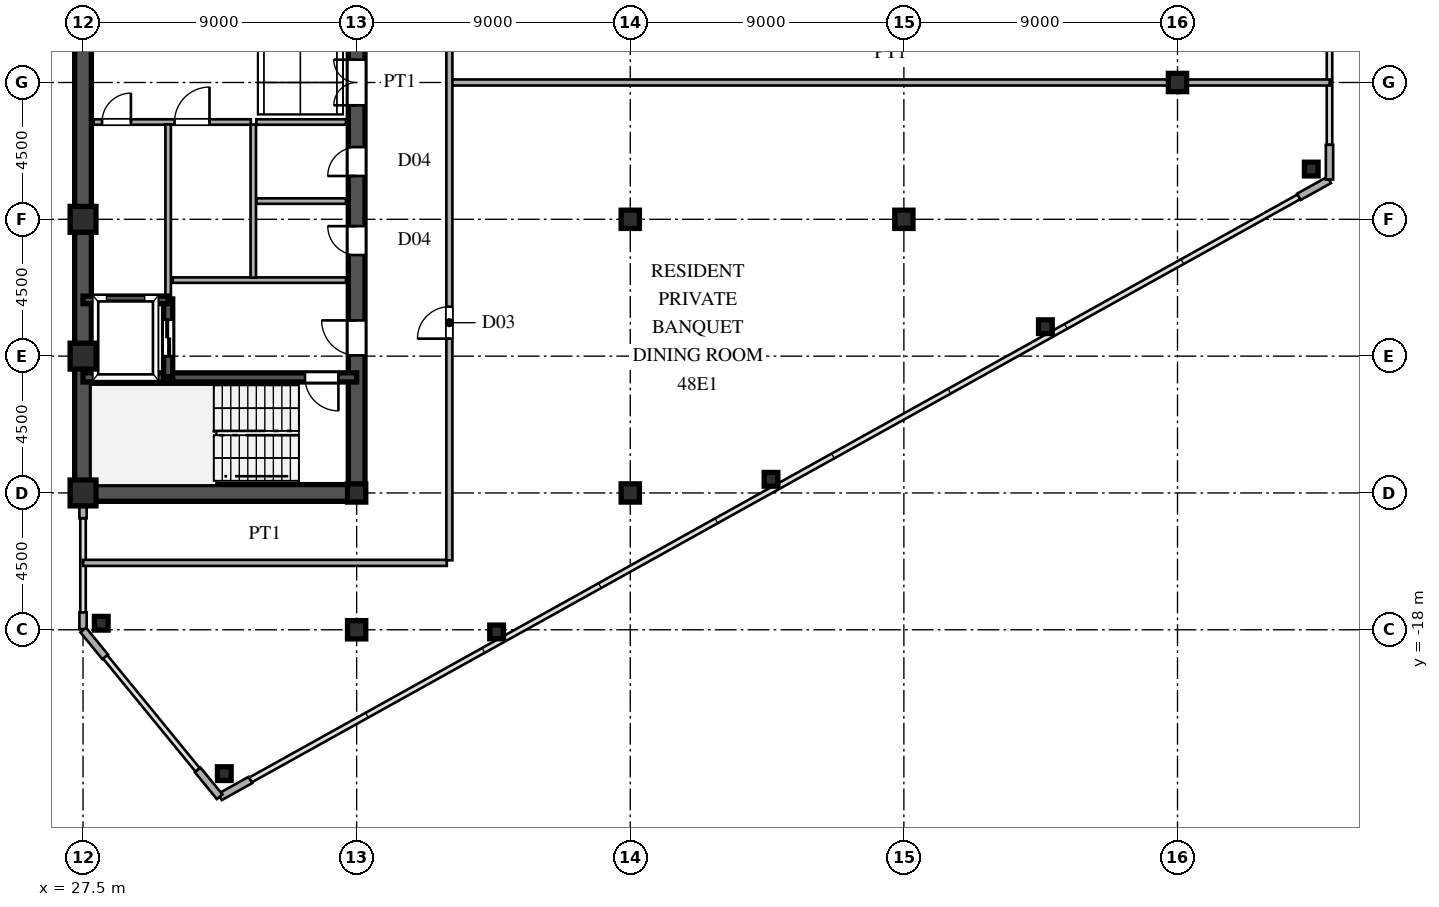
"""IFC4 building model, lengths in metres.
Left out: names, types, materials, properties, quantities, classifications, styles, units other than length and angle.
Written with IfcOpenShell. Run it as: python <this file> out.ifc"""

import sys

from ifc_helpers import new_model, si_unit, direction, frame, frame_2d, origin, origin_2d, place, context, subcontext, project, spatial, rectangle, hollow_rectangle, i_section, extrude, source, transform, mapped, element, fill, save


model = new_model("IFC4")
c1 = context("Model", 3, precision=1e-05, world=origin(), true_north=direction((0.0, 1.0)))
c2 = subcontext(c1, "Body", "Model", "MODEL_VIEW")
j1 = project(units=[si_unit("LENGTHUNIT", "METRE"), si_unit("PLANEANGLEUNIT", "RADIAN")], contexts=[c1])
p1 = place(None, origin())
s1 = spatial("IfcSite", under=j1, at=p1, CompositionType="ELEMENT")
p2 = place(p1, origin())
s2 = spatial("IfcBuilding", under=s1, at=p2, CompositionType="ELEMENT")
p3 = place(p2, frame((0.0, 0.0, 181.5)))
s3 = spatial("IfcBuildingStorey", under=s2, at=p3, CompositionType="ELEMENT", Elevation=181.5)
m1 = source(origin(), c2, "Body", "SweptSolid", [
    extrude(hollow_rectangle(XDim=0.85, YDim=0.85, WallThickness=0.036, at=origin_2d()), origin(), (0.0, 0.0, 1.0), 3.6),
])
for number, where, z_axis, x_axis in (
    (1, (27.5, -13.5, 0.0), (0.0, 0.0, 1.0), (1.0, 0.0, 0.0)),
    (2, (27.5, -9.0, 0.0), (0.0, 0.0, 1.0), (1.0, 0.0, 0.0)),
    (3, (27.5, -4.5, 0.0), (0.0, 0.0, 1.0), (1.0, 0.0, 0.0)),
):
    element("IfcColumn", number, at=place(p3, frame(where, z_axis=z_axis, x_axis=x_axis)), inside=s3, PredefinedType="COLUMN", context=c2, shape_type="MappedRepresentation", body=[
        mapped(m1, transform((0.0, 0.0, 0.0), scale=1.0)),
    ])
m2 = source(origin(), c2, "Body", "SweptSolid", [
    extrude(i_section(OverallWidth=0.6, OverallDepth=0.6, WebThickness=0.025, FlangeThickness=0.04, at=origin_2d()), origin(), (0.0, 0.0, 1.0), 3.6),
])
for number, where, z_axis, x_axis in (
    (4, (36.5, -18.0, 0.0), (0.0, 0.0, 1.0), (1.0, 0.0, 0.0)),
    (5, (36.5, -13.5, 0.0), (0.0, 0.0, 1.0), (1.0, 0.0, 0.0)),
    (6, (45.5, -13.5, 0.0), (0.0, 0.0, 1.0), (1.0, 0.0, 0.0)),
    (7, (45.5, -4.5, 0.0), (0.0, 0.0, 1.0), (1.0, 0.0, 0.0)),
    (8, (54.5, -4.5, 0.0), (0.0, 0.0, 1.0), (1.0, 0.0, 0.0)),
    (9, (63.5, 0.0, 0.0), (0.0, 0.0, 1.0), (1.0, 0.0, 0.0)),
):
    element("IfcColumn", number, at=place(p3, frame(where, z_axis=z_axis, x_axis=x_axis)), inside=s3, PredefinedType="COLUMN", context=c2, shape_type="MappedRepresentation", body=[
        mapped(m2, transform((0.0, 0.0, 0.0), scale=1.0)),
    ])
m3 = source(origin(), c2, "Body", "SweptSolid", [
    extrude(hollow_rectangle(XDim=0.45, YDim=0.45, WallThickness=0.018, at=origin_2d()), origin(), (0.0, 0.0, 1.0), 3.6),
])
for number, where, z_axis, x_axis in (
    (10, (32.147, -22.732, 0.0), (0.0, 0.0, 1.0), (1.0, 0.0, 0.0)),
    (11, (67.9, -2.847, 0.0), (0.0, 0.0, 1.0), (1.0, 0.0, 0.0)),
    (12, (28.1, -17.786, 0.0), (0.0, 0.0, 1.0), (1.0, 0.0, 0.0)),
    (13, (41.104, -18.071, 0.0), (0.0, 0.0, 1.0), (1.0, 0.0, 0.0)),
    (14, (50.129, -13.051, 0.0), (0.0, 0.0, 1.0), (1.0, 0.0, 0.0)),
    (15, (59.155, -8.031, 0.0), (0.0, 0.0, 1.0), (1.0, 0.0, 0.0)),
):
    element("IfcColumn", number, at=place(p3, frame(where, z_axis=z_axis, x_axis=x_axis)), inside=s3, PredefinedType="COLUMN", context=c2, shape_type="MappedRepresentation", body=[
        mapped(m3, transform((0.0, 0.0, 0.0), scale=1.0)),
    ])
for number, where, z_axis, x_axis in (
    (16, (32.009, -23.495, 0.0), (0.0, 0.0, 1.0), (0.874, 0.486, 0.0)),
    (17, (67.495, -3.759, 0.0), (0.0, 0.0, 1.0), (0.874, 0.486, 0.0)),
    (18, (68.5, -3.19, 0.0), (0.0, 0.0, 1.0), (0.0, 1.0, 0.0)),
):
    element("IfcWall", number, at=place(p3, frame(where, z_axis=z_axis, x_axis=x_axis)), inside=s3, PredefinedType="SOLIDWALL", context=c2, shape_type="SweptSolid", body=[
        extrude(rectangle(XDim=1.14, YDim=0.24, at=frame_2d((0.57, 0.0))), origin(), (0.0, 0.0, 1.0), 3.38),
    ])
p4 = place(p3, frame((27.5, -17.98, 0.0), z_axis=(0.0, 0.0, 1.0), x_axis=(0.0, 1.0, 0.0)))
e19 = element("IfcWall", 19, at=p4, inside=s3, PredefinedType="SOLIDWALL", context=c2, shape_type="SweptSolid", body=[
    extrude(rectangle(XDim=0.55, YDim=0.24, at=frame_2d((0.275, 0.0))), origin(), (0.0, 0.0, 1.0), 3.38),
])
p5 = place(p3, frame((27.5, -14.33, 0.0), z_axis=(0.0, 0.0, 1.0), x_axis=(0.0, 1.0, 0.0)))
e20 = element("IfcWall", 20, at=p5, inside=s3, PredefinedType="SOLIDWALL", context=c2, shape_type="SweptSolid", body=[
    extrude(rectangle(XDim=0.55, YDim=0.24, at=frame_2d((0.275, 0.0))), origin(), (0.0, 0.0, 1.0), 2.88),
])
for number, where, z_axis, x_axis in (
    (21, (27.506, -18.008, 0.0), (0.0, 0.0, 1.0), (0.633, -0.774, 0.0)),
    (22, (31.272, -22.61, 0.0), (0.0, 0.0, 1.0), (0.633, -0.774, 0.0)),
):
    element("IfcWall", number, at=place(p3, frame(where, z_axis=z_axis, x_axis=x_axis)), inside=s3, PredefinedType="SOLIDWALL", context=c2, shape_type="SweptSolid", body=[
        extrude(rectangle(XDim=1.14, YDim=0.24, at=frame_2d((0.57, 0.0))), origin(), (0.0, 0.0, 1.0), 3.38),
    ])
p6 = place(p3, frame((27.5, -13.5, 0.0), z_axis=(0.0, 0.0, 1.0), x_axis=(0.0, 1.0, 0.0)))
e23 = element("IfcWall", 23, at=p6, inside=s3, PredefinedType="SHEAR", context=c2, shape_type="SweptSolid", body=[
    extrude(rectangle(XDim=12.2, YDim=0.55, at=frame_2d((6.1, 0.0))), origin(), (0.0, 0.0, 1.0), 3.38),
])
p7 = place(p3, frame((27.5, -1.3, 0.0), z_axis=(0.0, 0.0, 1.0), x_axis=(0.0, 1.0, 0.0)))
e24 = element("IfcWall", 24, at=p7, inside=s3, PredefinedType="SHEAR", context=c2, shape_type="SweptSolid", body=[
    extrude(rectangle(XDim=2.6, YDim=0.55, at=frame_2d((1.3, 0.0))), origin(), (0.0, 0.0, 1.0), 3.38),
])
p8 = place(p3, frame((27.5, -13.5, 0.0), z_axis=(0.0, 0.0, 1.0), x_axis=(1.0, 0.0, 0.0)))
e25 = element("IfcWall", 25, at=p8, inside=s3, PredefinedType="SHEAR", context=c2, shape_type="SweptSolid", body=[
    extrude(rectangle(XDim=9.0, YDim=0.55, at=frame_2d((4.5, 0.0))), origin(), (0.0, 0.0, 1.0), 3.38),
])
p9 = place(p3, frame((36.5, -13.65, 0.0), z_axis=(0.0, 0.0, 1.0), x_axis=(0.0, 1.0, 0.0)))
e26 = element("IfcWall", 26, at=p9, inside=s3, PredefinedType="SHEAR", context=c2, shape_type="SweptSolid", body=[
    extrude(rectangle(XDim=7.15, YDim=0.55, at=frame_2d((3.575, 0.0))), origin(), (0.0, 0.0, 1.0), 3.38),
])
p10 = place(p9, frame((4.675, 0.0, 0.0)))
e27 = element("IfcOpeningElement", 27, at=p10, cuts=e26, PredefinedType="OPENING", context=c2, shape_type="SweptSolid", body=[
    extrude(rectangle(XDim=1.15, YDim=2.2, at=frame_2d((0.575, 1.1))), frame((0.0, 0.285, 0.0), z_axis=(0.0, -1.0, 0.0), x_axis=(1.0, 0.0, 0.0)), (0.0, 0.0, 1.0), 0.57),
])
p11 = place(p3, frame((36.5, -1.3, 0.0), z_axis=(0.0, 0.0, 1.0), x_axis=(0.0, 1.0, 0.0)))
e28 = element("IfcWall", 28, at=p11, inside=s3, PredefinedType="SHEAR", context=c2, shape_type="SweptSolid", body=[
    extrude(rectangle(XDim=2.6, YDim=0.55, at=frame_2d((1.3, 0.0))), origin(), (0.0, 0.0, 1.0), 3.38),
])
p12 = place(p11, frame((0.55, 0.0, 0.0)))
e29 = element("IfcOpeningElement", 29, at=p12, cuts=e28, PredefinedType="OPENING", context=c2, shape_type="SweptSolid", body=[
    extrude(rectangle(XDim=1.5, YDim=2.3, at=frame_2d((0.75, 1.15))), frame((0.0, 0.285, 0.0), z_axis=(0.0, -1.0, 0.0), x_axis=(1.0, 0.0, 0.0)), (0.0, 0.0, 1.0), 0.57),
])
p13 = place(p3, frame((36.5, -6.5, 0.0), z_axis=(0.0, 0.0, 1.0), x_axis=(0.0, 1.0, 0.0)))
e30 = element("IfcWall", 30, at=p13, inside=s3, PredefinedType="SHEAR", context=c2, shape_type="SweptSolid", body=[
    extrude(rectangle(XDim=2.6, YDim=0.55, at=frame_2d((1.3, 0.0))), origin(), (0.0, 0.0, 1.0), 3.38),
])
p14 = place(p13, frame((0.825, 0.0, 0.0)))
e31 = element("IfcOpeningElement", 31, at=p14, cuts=e30, PredefinedType="OPENING", context=c2, shape_type="SweptSolid", body=[
    extrude(rectangle(XDim=0.95, YDim=2.15, at=frame_2d((0.475, 1.075))), frame((0.0, 0.285, 0.0), z_axis=(0.0, -1.0, 0.0), x_axis=(1.0, 0.0, 0.0)), (0.0, 0.0, 1.0), 0.57),
])
p15 = place(p3, frame((36.5, -3.9, 0.0), z_axis=(0.0, 0.0, 1.0), x_axis=(0.0, 1.0, 0.0)))
e32 = element("IfcWall", 32, at=p15, inside=s3, PredefinedType="SHEAR", context=c2, shape_type="SweptSolid", body=[
    extrude(rectangle(XDim=2.6, YDim=0.55, at=frame_2d((1.3, 0.0))), origin(), (0.0, 0.0, 1.0), 3.38),
])
p16 = place(p15, frame((0.825, 0.0, 0.0)))
e33 = element("IfcOpeningElement", 33, at=p16, cuts=e32, PredefinedType="OPENING", context=c2, shape_type="SweptSolid", body=[
    extrude(rectangle(XDim=0.95, YDim=2.15, at=frame_2d((0.475, 1.075))), frame((0.0, 0.285, 0.0), z_axis=(0.0, -1.0, 0.0), x_axis=(1.0, 0.0, 0.0)), (0.0, 0.0, 1.0), 0.57),
])
p17 = place(p3, frame((27.5, -9.7, 0.0), z_axis=(0.0, 0.0, 1.0), x_axis=(1.0, 0.0, 0.0)))
e34 = element("IfcWall", 34, at=p17, inside=s3, PredefinedType="SHEAR", context=c2, shape_type="SweptSolid", body=[
    extrude(rectangle(XDim=9.0, YDim=0.3, at=frame_2d((4.5, 0.0))), origin(), (0.0, 0.0, 1.0), 3.38),
])
p18 = place(p17, frame((7.3, 0.0, 0.0)))
e35 = element("IfcOpeningElement", 35, at=p18, cuts=e34, PredefinedType="OPENING", context=c2, shape_type="SweptSolid", body=[
    extrude(rectangle(XDim=1.1, YDim=2.2, at=frame_2d((0.55, 1.1))), frame((0.0, 0.16, 0.0), z_axis=(0.0, -1.0, 0.0), x_axis=(1.0, 0.0, 0.0)), (0.0, 0.0, 1.0), 0.32),
])
p19 = place(p3, frame((27.5, -7.15, 0.0), z_axis=(0.0, 0.0, 1.0), x_axis=(1.0, 0.0, 0.0)))
e36 = element("IfcWall", 36, at=p19, inside=s3, PredefinedType="SHEAR", context=c2, shape_type="SweptSolid", body=[
    extrude(rectangle(XDim=2.8, YDim=0.25, at=frame_2d((1.4, 0.0))), origin(), (0.0, 0.0, 1.0), 3.38),
])
p20 = place(p3, frame((30.3, -9.68, 0.0), z_axis=(0.0, 0.0, 1.0), x_axis=(0.0, 1.0, 0.0)))
e37 = element("IfcWall", 37, at=p20, inside=s3, PredefinedType="SHEAR", context=c2, shape_type="SweptSolid", body=[
    extrude(rectangle(XDim=2.56, YDim=0.3, at=frame_2d((1.28, 0.0))), origin(), (0.0, 0.0, 1.0), 3.38),
])
p21 = place(p20, frame((0.68, 0.0, 0.0)))
e38 = element("IfcOpeningElement", 38, at=p21, cuts=e37, PredefinedType="OPENING", context=c2, shape_type="SweptSolid", body=[
    extrude(rectangle(XDim=1.2, YDim=2.25, at=frame_2d((0.6, 1.125))), frame((0.0, 0.16, 0.0), z_axis=(0.0, -1.0, 0.0), x_axis=(1.0, 0.0, 0.0)), (0.0, 0.0, 1.0), 0.32),
])
p22 = place(p3, frame((30.45, -6.5, 0.0), z_axis=(0.0, 0.0, 1.0), x_axis=(1.0, 0.0, 0.0)))
e39 = element("IfcWall", 39, at=p22, inside=s3, PredefinedType="PARTITIONING", context=c2, shape_type="SweptSolid", body=[
    extrude(rectangle(XDim=5.7, YDim=0.18, at=frame_2d((2.85, 0.0))), origin(), (0.0, 0.0, 1.0), 3.38),
])
p23 = place(p3, frame((33.1, -6.42, 0.0), z_axis=(0.0, 0.0, 1.0), x_axis=(0.0, 1.0, 0.0)))
e40 = element("IfcWall", 40, at=p23, inside=s3, PredefinedType="PARTITIONING", context=c2, shape_type="SweptSolid", body=[
    extrude(rectangle(XDim=5.04, YDim=0.18, at=frame_2d((2.52, 0.0))), origin(), (0.0, 0.0, 1.0), 3.38),
])
p24 = place(p3, frame((27.85, -1.3, 0.0), z_axis=(0.0, 0.0, 1.0), x_axis=(1.0, 0.0, 0.0)))
e41 = element("IfcWall", 41, at=p24, inside=s3, PredefinedType="PARTITIONING", context=c2, shape_type="SweptSolid", body=[
    extrude(rectangle(XDim=2.45, YDim=0.18, at=frame_2d((1.225, 0.0))), origin(), (0.0, 0.0, 1.0), 3.38),
])
p25 = place(p24, frame((0.275, 0.0, 0.0)))
e42 = element("IfcOpeningElement", 42, at=p25, cuts=e41, PredefinedType="OPENING", context=c2, shape_type="SweptSolid", body=[
    extrude(rectangle(XDim=0.95, YDim=2.15, at=frame_2d((0.475, 1.075))), frame((0.0, 0.1, 0.0), z_axis=(0.0, -1.0, 0.0), x_axis=(1.0, 0.0, 0.0)), (0.0, 0.0, 1.0), 0.2),
])
p26 = place(p3, frame((30.3, -1.3, 0.0), z_axis=(0.0, 0.0, 1.0), x_axis=(1.0, 0.0, 0.0)))
e43 = element("IfcWall", 43, at=p26, inside=s3, PredefinedType="PARTITIONING", context=c2, shape_type="SweptSolid", body=[
    extrude(rectangle(XDim=2.72, YDim=0.18, at=frame_2d((1.36, 0.0))), origin(), (0.0, 0.0, 1.0), 3.38),
])
p27 = place(p26, frame((0.21, 0.0, 0.0)))
e44 = element("IfcOpeningElement", 44, at=p27, cuts=e43, PredefinedType="OPENING", context=c2, shape_type="SweptSolid", body=[
    extrude(rectangle(XDim=1.15, YDim=2.2, at=frame_2d((0.575, 1.1))), frame((0.0, 0.1, 0.0), z_axis=(0.0, -1.0, 0.0), x_axis=(1.0, 0.0, 0.0)), (0.0, 0.0, 1.0), 0.2),
])
p28 = place(p3, frame((30.3, -7.12, 0.0), z_axis=(0.0, 0.0, 1.0), x_axis=(0.0, 1.0, 0.0)))
e45 = element("IfcWall", 45, at=p28, inside=s3, PredefinedType="PARTITIONING", context=c2, shape_type="SweptSolid", body=[
    extrude(rectangle(XDim=5.74, YDim=0.18, at=frame_2d((2.87, 0.0))), origin(), (0.0, 0.0, 1.0), 3.38),
])
for number, where, z_axis, x_axis in (
    (46, (33.2, -1.3, 0.0), (0.0, 0.0, 1.0), (1.0, 0.0, 0.0)),
    (47, (33.2, -3.9, 0.0), (0.0, 0.0, 1.0), (1.0, 0.0, 0.0)),
):
    element("IfcWall", number, at=place(p3, frame(where, z_axis=z_axis, x_axis=x_axis)), inside=s3, PredefinedType="PARTITIONING", context=c2, shape_type="SweptSolid", body=[
        extrude(rectangle(XDim=2.95, YDim=0.18, at=frame_2d((1.475, 0.0))), origin(), (0.0, 0.0, 1.0), 3.38),
    ])
p29 = place(p3, frame((27.5, -15.8, 0.0), z_axis=(0.0, 0.0, 1.0), x_axis=(1.0, 0.0, 0.0)))
e48 = element("IfcWall", 48, at=p29, inside=s3, PredefinedType="PARTITIONING", context=c2, shape_type="SweptSolid", body=[
    extrude(rectangle(XDim=11.965, YDim=0.2, at=frame_2d((5.982, 0.0))), origin(), (0.0, 0.0, 1.0), 3.38),
])
p30 = place(p3, frame((39.63, 0.0, 0.0), z_axis=(0.0, 0.0, 1.0), x_axis=(1.0, 0.0, 0.0)))
e49 = element("IfcWall", 49, at=p30, inside=s3, PredefinedType="PARTITIONING", context=c2, shape_type="SweptSolid", body=[
    extrude(rectangle(XDim=28.875, YDim=0.2, at=frame_2d((14.438, 0.0))), origin(), (0.0, 0.0, 1.0), 3.38),
])
p31 = place(p3, frame((39.55, -15.715, 0.0), z_axis=(0.0, 0.0, 1.0), x_axis=(0.0, 1.0, 0.0)))
e50 = element("IfcWall", 50, at=p31, inside=s3, PredefinedType="PARTITIONING", context=c2, shape_type="SweptSolid", body=[
    extrude(rectangle(XDim=31.43, YDim=0.2, at=frame_2d((15.715, 0.0))), origin(), (0.0, 0.0, 1.0), 3.38),
])
p32 = place(p31, frame((7.29, 0.0, 0.0)))
e51 = element("IfcOpeningElement", 51, at=p32, cuts=e50, PredefinedType="OPENING", context=c2, shape_type="SweptSolid", body=[
    extrude(rectangle(XDim=1.05, YDim=2.25, at=frame_2d((0.525, 1.125))), frame((0.0, 0.11, 0.0), z_axis=(0.0, -1.0, 0.0), x_axis=(1.0, 0.0, 0.0)), (0.0, 0.0, 1.0), 0.22),
])
p33 = place(p31, frame((23.09, 0.0, 0.0)))
e52 = element("IfcOpeningElement", 52, at=p33, cuts=e50, PredefinedType="OPENING", context=c2, shape_type="SweptSolid", body=[
    extrude(rectangle(XDim=1.05, YDim=2.25, at=frame_2d((0.525, 1.125))), frame((0.0, 0.11, 0.0), z_axis=(0.0, -1.0, 0.0), x_axis=(1.0, 0.0, 0.0)), (0.0, 0.0, 1.0), 0.22),
])
m4 = source(origin(), c2, "Body", "SweptSolid", [
    extrude(rectangle(XDim=1.15, YDim=2.2, at=frame_2d((0.575, 1.1))), frame((0.0, 0.025, 0.0), z_axis=(0.0, -1.0, 0.0), x_axis=(1.0, 0.0, 0.0)), (0.0, 0.0, 1.0), 0.05),
])
p34 = place(p10, origin())
e53 = element("IfcDoor", 53, at=p34, inside=s3, OperationType="SINGLE_SWING_RIGHT", PredefinedType="DOOR", context=c2, shape_type="MappedRepresentation", body=[
    mapped(m4, transform((0.0, 0.0, 0.0), scale=1.0)),
])
fill(e27, e53)
m5 = source(origin(), c2, "Body", "SweptSolid", [
    extrude(rectangle(XDim=1.5, YDim=2.3, at=frame_2d((0.75, 1.15))), frame((0.0, 0.025, 0.0), z_axis=(0.0, -1.0, 0.0), x_axis=(1.0, 0.0, 0.0)), (0.0, 0.0, 1.0), 0.05),
])
p35 = place(p12, origin())
e54 = element("IfcDoor", 54, at=p35, inside=s3, OperationType="DOUBLE_SWING_LEFT", PredefinedType="DOOR", context=c2, shape_type="MappedRepresentation", body=[
    mapped(m5, transform((0.0, 0.0, 0.0), scale=1.0)),
])
fill(e29, e54)
m6 = source(origin(), c2, "Body", "SweptSolid", [
    extrude(rectangle(XDim=0.95, YDim=2.15, at=frame_2d((0.475, 1.075))), frame((0.0, 0.025, 0.0), z_axis=(0.0, -1.0, 0.0), x_axis=(1.0, 0.0, 0.0)), (0.0, 0.0, 1.0), 0.05),
])
p36 = place(p14, origin())
e55 = element("IfcDoor", 55, at=p36, inside=s3, OperationType="SINGLE_SWING_RIGHT", PredefinedType="DOOR", context=c2, shape_type="MappedRepresentation", body=[
    mapped(m6, transform((0.0, 0.0, 0.0), scale=1.0)),
])
fill(e31, e55)
p37 = place(p16, origin())
e56 = element("IfcDoor", 56, at=p37, inside=s3, OperationType="SINGLE_SWING_LEFT", PredefinedType="DOOR", context=c2, shape_type="MappedRepresentation", body=[
    mapped(m6, transform((0.0, 0.0, 0.0), scale=1.0)),
])
fill(e33, e56)
m7 = source(origin(), c2, "Body", "SweptSolid", [
    extrude(rectangle(XDim=1.1, YDim=2.2, at=frame_2d((0.55, 1.1))), frame((0.0, 0.025, 0.0), z_axis=(0.0, -1.0, 0.0), x_axis=(1.0, 0.0, 0.0)), (0.0, 0.0, 1.0), 0.05),
])
p38 = place(p18, frame((1.1, 0.0, 0.0), z_axis=(0.0, 0.0, 1.0), x_axis=(-1.0, 0.0, 0.0)))
e57 = element("IfcDoor", 57, at=p38, inside=s3, OperationType="SINGLE_SWING_RIGHT", PredefinedType="DOOR", context=c2, shape_type="MappedRepresentation", body=[
    mapped(m7, transform((0.0, 0.0, 0.0), scale=1.0)),
])
fill(e35, e57)
m8 = source(origin(), c2, "Body", "SweptSolid", [
    extrude(rectangle(XDim=1.2, YDim=2.25, at=frame_2d((0.6, 1.125))), frame((0.0, 0.025, 0.0), z_axis=(0.0, -1.0, 0.0), x_axis=(1.0, 0.0, 0.0)), (0.0, 0.0, 1.0), 0.05),
])
p39 = place(p21, origin())
e58 = element("IfcDoor", 58, at=p39, inside=s3, OperationType="DOUBLE_DOOR_SLIDING", PredefinedType="DOOR", context=c2, shape_type="MappedRepresentation", body=[
    mapped(m8, transform((0.0, 0.0, 0.0), scale=1.0)),
])
fill(e38, e58)
p40 = place(p25, origin())
e59 = element("IfcDoor", 59, at=p40, inside=s3, OperationType="SINGLE_SWING_RIGHT", PredefinedType="DOOR", context=c2, shape_type="MappedRepresentation", body=[
    mapped(m6, transform((0.0, 0.0, 0.0), scale=1.0)),
])
fill(e42, e59)
p41 = place(p27, origin())
e60 = element("IfcDoor", 60, at=p41, inside=s3, OperationType="SINGLE_SWING_RIGHT", PredefinedType="DOOR", context=c2, shape_type="MappedRepresentation", body=[
    mapped(m4, transform((0.0, 0.0, 0.0), scale=1.0)),
])
fill(e44, e60)
m9 = source(origin(), c2, "Body", "SweptSolid", [
    extrude(rectangle(XDim=1.05, YDim=2.25, at=frame_2d((0.525, 1.125))), frame((0.0, 0.025, 0.0), z_axis=(0.0, -1.0, 0.0), x_axis=(1.0, 0.0, 0.0)), (0.0, 0.0, 1.0), 0.05),
])
p42 = place(p32, origin())
e61 = element("IfcDoor", 61, at=p42, inside=s3, OperationType="SINGLE_SWING_LEFT", PredefinedType="DOOR", context=c2, shape_type="MappedRepresentation", body=[
    mapped(m9, transform((0.0, 0.0, 0.0), scale=1.0)),
])
fill(e51, e61)
save(model, sys.argv[1])
